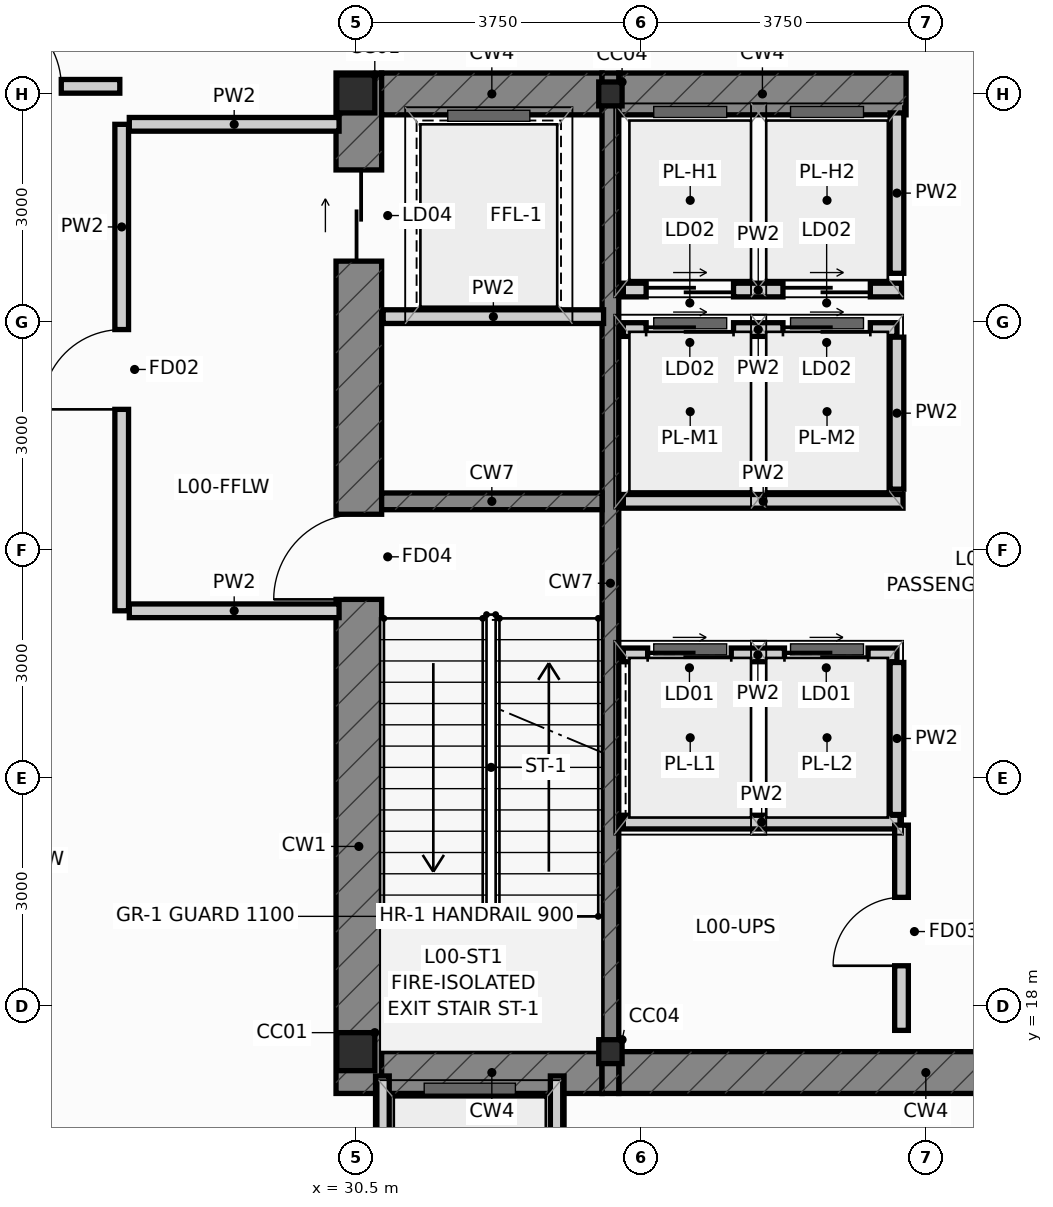
"""IFC4 building model, lengths in metres.
Left out: names, types, materials, properties, quantities, classifications, styles, units other than length and angle.
Written with IfcOpenShell. Run it as: python <this file> out.ifc"""

import sys

from ifc_helpers import new_model, si_unit, direction, frame, frame_2d, origin, origin_2d, place, context, subcontext, project, spatial, rectangle, i_section, extrude, source, transform, mapped, element, fill, save


model = new_model("IFC4")
c1 = context("Model", 3, precision=1e-05, world=origin(), true_north=direction((0.0, 1.0)))
c2 = subcontext(c1, "Body", "Model", "MODEL_VIEW")
j1 = project(units=[si_unit("LENGTHUNIT", "METRE"), si_unit("PLANEANGLEUNIT", "RADIAN")], contexts=[c1])
p1 = place(None, origin())
s1 = spatial("IfcSite", under=j1, at=p1, CompositionType="ELEMENT")
p2 = place(p1, origin())
s2 = spatial("IfcBuilding", under=s1, at=p2, CompositionType="ELEMENT")
p3 = place(p2, origin())
s3 = spatial("IfcBuildingStorey", under=s2, at=p3, CompositionType="ELEMENT", Elevation=0.0)
m1 = source(origin(), c2, "Body", "SweptSolid", [
    extrude(i_section(OverallWidth=0.5, OverallDepth=0.5, WebThickness=0.028, FlangeThickness=0.04, at=origin_2d()), origin(), (0.0, 0.0, 1.0), 5.4),
])
for number, where, z_axis, x_axis in (
    (1, (30.5, 17.4, 0.0), (0.0, 0.0, 1.0), (1.0, 0.0, 0.0)),
    (2, (30.5, 30.0, 0.0), (0.0, 0.0, 1.0), (1.0, 0.0, 0.0)),
):
    element("IfcColumn", number, at=place(p3, frame(where, z_axis=z_axis, x_axis=x_axis)), inside=s3, PredefinedType="COLUMN", context=c2, shape_type="MappedRepresentation", body=[
        mapped(m1, transform((0.0, 0.0, 0.0), scale=1.0)),
    ])
m2 = source(origin(), c2, "Body", "SweptSolid", [
    extrude(i_section(OverallWidth=0.307, OverallDepth=0.315, WebThickness=0.012, FlangeThickness=0.019, at=origin_2d()), origin(), (0.0, 0.0, 1.0), 5.4),
])
for number, where, z_axis, x_axis in (
    (3, (33.85, 17.4, 0.0), (0.0, 0.0, 1.0), (1.0, 0.0, 0.0)),
    (4, (33.85, 30.0, 0.0), (0.0, 0.0, 1.0), (1.0, 0.0, 0.0)),
):
    element("IfcColumn", number, at=place(p3, frame(where, z_axis=z_axis, x_axis=x_axis)), inside=s3, PredefinedType="COLUMN", context=c2, shape_type="MappedRepresentation", body=[
        mapped(m2, transform((0.0, 0.0, 0.0), scale=1.0)),
    ])
p4 = place(p3, frame((30.54, 16.85, 0.0), z_axis=(0.0, 0.0, 1.0), x_axis=(0.0, 1.0, 0.0)))
e5 = element("IfcWall", 5, at=p4, inside=s3, PredefinedType="SHEAR", context=c2, shape_type="SweptSolid", body=[
    extrude(rectangle(XDim=13.425, YDim=0.6, at=frame_2d((6.712, 0.0))), origin(), (0.0, 0.0, 1.0), 5.4),
])
p5 = place(p4, frame((6.5, 0.0, 0.0)))
e6 = element("IfcOpeningElement", 6, at=p5, cuts=e5, PredefinedType="OPENING", context=c2, shape_type="SweptSolid", body=[
    extrude(rectangle(XDim=1.12, YDim=2.15, at=frame_2d((0.56, 1.075))), frame((0.0, 0.312, 0.0), z_axis=(0.0, -1.0, 0.0), x_axis=(1.0, 0.0, 0.0)), (0.0, 0.0, 1.0), 0.624),
])
p6 = place(p4, frame((10.95, 0.0, 0.0)))
e7 = element("IfcOpeningElement", 7, at=p6, cuts=e5, PredefinedType="OPENING", context=c2, shape_type="SweptSolid", body=[
    extrude(rectangle(XDim=1.2, YDim=2.2, at=frame_2d((0.6, 1.1))), frame((0.0, 0.312, 0.0), z_axis=(0.0, -1.0, 0.0), x_axis=(1.0, 0.0, 0.0)), (0.0, 0.0, 1.0), 0.624),
])
p7 = place(p3, frame((30.84, 17.125, 0.0), z_axis=(0.0, 0.0, 1.0), x_axis=(1.0, 0.0, 0.0)))
e8 = element("IfcWall", 8, at=p7, inside=s3, PredefinedType="SHEAR", context=c2, shape_type="SweptSolid", body=[
    extrude(rectangle(XDim=2.9, YDim=0.55, at=frame_2d((1.45, 0.0))), origin(), (0.0, 0.0, 1.0), 5.4),
])
p8 = place(p3, frame((33.96, 17.125, 0.0), z_axis=(0.0, 0.0, 1.0), x_axis=(1.0, 0.0, 0.0)))
e9 = element("IfcWall", 9, at=p8, inside=s3, PredefinedType="SHEAR", context=c2, shape_type="SweptSolid", body=[
    extrude(rectangle(XDim=8.08, YDim=0.55, at=frame_2d((4.04, 0.0))), origin(), (0.0, 0.0, 1.0), 5.4),
])
p9 = place(p3, frame((30.84, 30.0, 0.0), z_axis=(0.0, 0.0, 1.0), x_axis=(1.0, 0.0, 0.0)))
e10 = element("IfcWall", 10, at=p9, inside=s3, PredefinedType="SHEAR", context=c2, shape_type="SweptSolid", body=[
    extrude(rectangle(XDim=2.9, YDim=0.55, at=frame_2d((1.45, 0.0))), origin(), (0.0, 0.0, 1.0), 5.4),
])
p10 = place(p3, frame((33.96, 30.0, 0.0), z_axis=(0.0, 0.0, 1.0), x_axis=(1.0, 0.0, 0.0)))
e11 = element("IfcWall", 11, at=p10, inside=s3, PredefinedType="SHEAR", context=c2, shape_type="SweptSolid", body=[
    extrude(rectangle(XDim=3.78, YDim=0.55, at=frame_2d((1.89, 0.0))), origin(), (0.0, 0.0, 1.0), 5.4),
])
p11 = place(p3, frame((33.85, 16.85, 0.0), z_axis=(0.0, 0.0, 1.0), x_axis=(0.0, 1.0, 0.0)))
e12 = element("IfcWall", 12, at=p11, inside=s3, PredefinedType="SHEAR", context=c2, shape_type="SweptSolid", body=[
    extrude(rectangle(XDim=13.425, YDim=0.22, at=frame_2d((6.712, 0.0))), origin(), (0.0, 0.0, 1.0), 5.4),
])
p12 = place(p3, frame((30.84, 24.64, 0.0), z_axis=(0.0, 0.0, 1.0), x_axis=(1.0, 0.0, 0.0)))
e13 = element("IfcWall", 13, at=p12, inside=s3, PredefinedType="SHEAR", context=c2, shape_type="SweptSolid", body=[
    extrude(rectangle(XDim=2.9, YDim=0.22, at=frame_2d((1.45, 0.0))), origin(), (0.0, 0.0, 1.0), 5.4),
])
p13 = place(p3, frame((30.85, 14.42, 0.0), z_axis=(0.0, 0.0, 1.0), x_axis=(0.0, 1.0, 0.0)))
e14 = element("IfcWall", 14, at=p13, inside=s3, PredefinedType="PARTITIONING", context=c2, shape_type="SweptSolid", body=[
    extrude(rectangle(XDim=2.66, YDim=0.18, at=frame_2d((1.33, 0.0))), origin(), (0.0, 0.0, 1.0), 4.453),
])
p14 = place(p3, frame((33.15, 14.42, 0.0), z_axis=(0.0, 0.0, 1.0), x_axis=(0.0, 1.0, 0.0)))
e15 = element("IfcWall", 15, at=p14, inside=s3, PredefinedType="PARTITIONING", context=c2, shape_type="SweptSolid", body=[
    extrude(rectangle(XDim=2.66, YDim=0.18, at=frame_2d((1.33, 0.0))), origin(), (0.0, 0.0, 1.0), 5.08),
])
p15 = place(p3, frame((34.02, 22.62, 0.0), z_axis=(0.0, 0.0, 1.0), x_axis=(1.0, 0.0, 0.0)))
e16 = element("IfcWall", 16, at=p15, inside=s3, PredefinedType="PARTITIONING", context=c2, shape_type="SweptSolid", body=[
    extrude(rectangle(XDim=3.6, YDim=0.18, at=frame_2d((1.8, 0.0))), origin(), (0.0, 0.0, 1.0), 5.08),
])
p16 = place(p15, frame((0.32, 0.0, 0.0)))
e17 = element("IfcOpeningElement", 17, at=p16, cuts=e16, PredefinedType="OPENING", context=c2, shape_type="SweptSolid", body=[
    extrude(rectangle(XDim=1.1, YDim=2.2, at=frame_2d((0.55, 1.1))), frame((0.0, 0.102, 0.0), z_axis=(0.0, -1.0, 0.0), x_axis=(1.0, 0.0, 0.0)), (0.0, 0.0, 1.0), 0.204),
])
p17 = place(p15, frame((2.12, 0.0, 0.0)))
e18 = element("IfcOpeningElement", 18, at=p17, cuts=e16, PredefinedType="OPENING", context=c2, shape_type="SweptSolid", body=[
    extrude(rectangle(XDim=1.1, YDim=2.2, at=frame_2d((0.55, 1.1))), frame((0.0, 0.102, 0.0), z_axis=(0.0, -1.0, 0.0), x_axis=(1.0, 0.0, 0.0)), (0.0, 0.0, 1.0), 0.204),
])
p18 = place(p3, frame((37.62, 20.52, 0.0), z_axis=(0.0, 0.0, 1.0), x_axis=(0.0, 1.0, 0.0)))
e19 = element("IfcWall", 19, at=p18, inside=s3, PredefinedType="PARTITIONING", context=c2, shape_type="SweptSolid", body=[
    extrude(rectangle(XDim=2.0, YDim=0.18, at=frame_2d((1.0, 0.0))), origin(), (0.0, 0.0, 1.0), 5.08),
])
p19 = place(p3, frame((34.02, 26.9, 0.0), z_axis=(0.0, 0.0, 1.0), x_axis=(1.0, 0.0, 0.0)))
e20 = element("IfcWall", 20, at=p19, inside=s3, PredefinedType="PARTITIONING", context=c2, shape_type="SweptSolid", body=[
    extrude(rectangle(XDim=3.6, YDim=0.18, at=frame_2d((1.8, 0.0))), origin(), (0.0, 0.0, 1.0), 5.08),
])
p20 = place(p19, frame((0.3, 0.0, 0.0)))
e21 = element("IfcOpeningElement", 21, at=p20, cuts=e20, PredefinedType="OPENING", context=c2, shape_type="SweptSolid", body=[
    extrude(rectangle(XDim=1.15, YDim=2.2, at=frame_2d((0.575, 1.1))), frame((0.0, 0.102, 0.0), z_axis=(0.0, -1.0, 0.0), x_axis=(1.0, 0.0, 0.0)), (0.0, 0.0, 1.0), 0.204),
])
p21 = place(p19, frame((2.1, 0.0, 0.0)))
e22 = element("IfcOpeningElement", 22, at=p21, cuts=e20, PredefinedType="OPENING", context=c2, shape_type="SweptSolid", body=[
    extrude(rectangle(XDim=1.15, YDim=2.2, at=frame_2d((0.575, 1.1))), frame((0.0, 0.102, 0.0), z_axis=(0.0, -1.0, 0.0), x_axis=(1.0, 0.0, 0.0)), (0.0, 0.0, 1.0), 0.204),
])
p22 = place(p3, frame((37.62, 24.8, 0.0), z_axis=(0.0, 0.0, 1.0), x_axis=(0.0, 1.0, 0.0)))
e23 = element("IfcWall", 23, at=p22, inside=s3, PredefinedType="PARTITIONING", context=c2, shape_type="SweptSolid", body=[
    extrude(rectangle(XDim=2.0, YDim=0.18, at=frame_2d((1.0, 0.0))), origin(), (0.0, 0.0, 1.0), 5.08),
])
p23 = place(p3, frame((34.02, 24.64, 0.0), z_axis=(0.0, 0.0, 1.0), x_axis=(1.0, 0.0, 0.0)))
e24 = element("IfcWall", 24, at=p23, inside=s3, PredefinedType="PARTITIONING", context=c2, shape_type="SweptSolid", body=[
    extrude(rectangle(XDim=3.68, YDim=0.18, at=frame_2d((1.84, 0.0))), origin(), (0.0, 0.0, 1.0), 5.08),
])
p24 = place(p3, frame((34.02, 27.42, 0.0), z_axis=(0.0, 0.0, 1.0), x_axis=(1.0, 0.0, 0.0)))
e25 = element("IfcWall", 25, at=p24, inside=s3, PredefinedType="PARTITIONING", context=c2, shape_type="SweptSolid", body=[
    extrude(rectangle(XDim=3.66, YDim=0.18, at=frame_2d((1.83, 0.0))), origin(), (0.0, 0.0, 1.0), 5.08),
])
p25 = place(p24, frame((0.3, 0.0, 0.0)))
e26 = element("IfcOpeningElement", 26, at=p25, cuts=e25, PredefinedType="OPENING", context=c2, shape_type="SweptSolid", body=[
    extrude(rectangle(XDim=1.15, YDim=2.2, at=frame_2d((0.575, 1.1))), frame((0.0, 0.102, 0.0), z_axis=(0.0, -1.0, 0.0), x_axis=(1.0, 0.0, 0.0)), (0.0, 0.0, 1.0), 0.204),
])
p26 = place(p24, frame((2.1, 0.0, 0.0)))
e27 = element("IfcOpeningElement", 27, at=p26, cuts=e25, PredefinedType="OPENING", context=c2, shape_type="SweptSolid", body=[
    extrude(rectangle(XDim=1.15, YDim=2.2, at=frame_2d((0.575, 1.1))), frame((0.0, 0.102, 0.0), z_axis=(0.0, -1.0, 0.0), x_axis=(1.0, 0.0, 0.0)), (0.0, 0.0, 1.0), 0.204),
])
p27 = place(p3, frame((37.62, 27.64, 0.0), z_axis=(0.0, 0.0, 1.0), x_axis=(0.0, 1.0, 0.0)))
e28 = element("IfcWall", 28, at=p27, inside=s3, PredefinedType="PARTITIONING", context=c2, shape_type="SweptSolid", body=[
    extrude(rectangle(XDim=2.11, YDim=0.18, at=frame_2d((1.055, 0.0))), origin(), (0.0, 0.0, 1.0), 5.08),
])
p28 = place(p3, frame((27.42, 23.2, 0.0), z_axis=(0.0, 0.0, 1.0), x_axis=(0.0, 1.0, 0.0)))
e29 = element("IfcWall", 29, at=p28, inside=s3, PredefinedType="PARTITIONING", context=c2, shape_type="SweptSolid", body=[
    extrude(rectangle(XDim=6.4, YDim=0.18, at=frame_2d((3.2, 0.0))), origin(), (0.0, 0.0, 1.0), 4.706),
])
p29 = place(p28, frame((2.65, 0.0, 0.0)))
e30 = element("IfcOpeningElement", 30, at=p29, cuts=e29, PredefinedType="OPENING", context=c2, shape_type="SweptSolid", body=[
    extrude(rectangle(XDim=1.05, YDim=2.15, at=frame_2d((0.525, 1.075))), frame((0.0, 0.102, 0.0), z_axis=(0.0, -1.0, 0.0), x_axis=(1.0, 0.0, 0.0)), (0.0, 0.0, 1.0), 0.204),
])
p30 = place(p3, frame((27.52, 23.2, 0.0), z_axis=(0.0, 0.0, 1.0), x_axis=(1.0, 0.0, 0.0)))
e31 = element("IfcWall", 31, at=p30, inside=s3, PredefinedType="PARTITIONING", context=c2, shape_type="SweptSolid", body=[
    extrude(rectangle(XDim=2.76, YDim=0.18, at=frame_2d((1.38, 0.0))), origin(), (0.0, 0.0, 1.0), 5.08),
])
p31 = place(p3, frame((27.52, 29.6, 0.0), z_axis=(0.0, 0.0, 1.0), x_axis=(1.0, 0.0, 0.0)))
e32 = element("IfcWall", 32, at=p31, inside=s3, PredefinedType="PARTITIONING", context=c2, shape_type="SweptSolid", body=[
    extrude(rectangle(XDim=2.76, YDim=0.18, at=frame_2d((1.38, 0.0))), origin(), (0.0, 0.0, 1.0), 4.453),
])
p32 = place(p3, frame((30.86, 27.07, 0.0), z_axis=(0.0, 0.0, 1.0), x_axis=(1.0, 0.0, 0.0)))
e33 = element("IfcWall", 33, at=p32, inside=s3, PredefinedType="PARTITIONING", context=c2, shape_type="SweptSolid", body=[
    extrude(rectangle(XDim=2.9, YDim=0.18, at=frame_2d((1.45, 0.0))), origin(), (0.0, 0.0, 1.0), 5.08),
])
p33 = place(p3, frame((34.02, 20.42, 0.0), z_axis=(0.0, 0.0, 1.0), x_axis=(1.0, 0.0, 0.0)))
e34 = element("IfcWall", 34, at=p33, inside=s3, PredefinedType="PARTITIONING", context=c2, shape_type="SweptSolid", body=[
    extrude(rectangle(XDim=3.64, YDim=0.18, at=frame_2d((1.82, 0.0))), origin(), (0.0, 0.0, 1.0), 5.08),
])
p34 = place(p3, frame((37.68, 17.68, 0.0), z_axis=(0.0, 0.0, 1.0), x_axis=(0.0, 1.0, 0.0)))
e35 = element("IfcWall", 35, at=p34, inside=s3, PredefinedType="PARTITIONING", context=c2, shape_type="SweptSolid", body=[
    extrude(rectangle(XDim=2.7, YDim=0.18, at=frame_2d((1.35, 0.0))), origin(), (0.0, 0.0, 1.0), 5.08),
])
p35 = place(p34, frame((0.85, 0.0, 0.0)))
e36 = element("IfcOpeningElement", 36, at=p35, cuts=e35, PredefinedType="OPENING", context=c2, shape_type="SweptSolid", body=[
    extrude(rectangle(XDim=0.9, YDim=2.1, at=frame_2d((0.45, 1.05))), frame((0.0, 0.102, 0.0), z_axis=(0.0, -1.0, 0.0), x_axis=(1.0, 0.0, 0.0)), (0.0, 0.0, 1.0), 0.204),
])
p36 = place(p3, frame((24.805, 30.1, 0.0), z_axis=(0.0, 0.0, 1.0), x_axis=(1.0, 0.0, 0.0)))
e37 = element("IfcWall", 37, at=p36, inside=s3, PredefinedType="PARTITIONING", context=c2, shape_type="SweptSolid", body=[
    extrude(rectangle(XDim=2.59, YDim=0.18, at=frame_2d((1.295, 0.0))), origin(), (0.0, 0.0, 1.0), 4.453),
])
p37 = place(p36, frame((0.77, 0.0, 0.0)))
e38 = element("IfcOpeningElement", 38, at=p37, cuts=e37, PredefinedType="OPENING", context=c2, shape_type="SweptSolid", body=[
    extrude(rectangle(XDim=1.05, YDim=2.15, at=frame_2d((0.525, 1.075))), frame((0.0, 0.102, 0.0), z_axis=(0.0, -1.0, 0.0), x_axis=(1.0, 0.0, 0.0)), (0.0, 0.0, 1.0), 0.204),
])
p38 = place(p5, origin())
e39 = element("IfcDoor", 39, at=p38, inside=s3, OperationType="SINGLE_SWING_LEFT", PredefinedType="DOOR", context=c2, shape_type="SweptSolid", body=[
    extrude(rectangle(XDim=1.12, YDim=2.15, at=frame_2d((0.56, 1.075))), frame((0.0, 0.025, 0.0), z_axis=(0.0, -1.0, 0.0), x_axis=(1.0, 0.0, 0.0)), (0.0, 0.0, 1.0), 0.05),
])
fill(e6, e39)
p39 = place(p6, origin())
e40 = element("IfcDoor", 40, at=p39, inside=s3, OperationType="SLIDING_TO_LEFT", PredefinedType="DOOR", context=c2, shape_type="SweptSolid", body=[
    extrude(rectangle(XDim=1.2, YDim=2.2, at=frame_2d((0.6, 1.1))), frame((0.0, 0.025, 0.0), z_axis=(0.0, -1.0, 0.0), x_axis=(1.0, 0.0, 0.0)), (0.0, 0.0, 1.0), 0.05),
])
fill(e7, e40)
p40 = place(p16, origin())
e41 = element("IfcDoor", 41, at=p40, inside=s3, OperationType="SLIDING_TO_LEFT", PredefinedType="DOOR", context=c2, shape_type="SweptSolid", body=[
    extrude(rectangle(XDim=1.1, YDim=2.2, at=frame_2d((0.55, 1.1))), frame((0.0, 0.025, 0.0), z_axis=(0.0, -1.0, 0.0), x_axis=(1.0, 0.0, 0.0)), (0.0, 0.0, 1.0), 0.05),
])
fill(e17, e41)
p41 = place(p17, origin())
e42 = element("IfcDoor", 42, at=p41, inside=s3, OperationType="SLIDING_TO_RIGHT", PredefinedType="DOOR", context=c2, shape_type="SweptSolid", body=[
    extrude(rectangle(XDim=1.1, YDim=2.2, at=frame_2d((0.55, 1.1))), frame((0.0, 0.025, 0.0), z_axis=(0.0, -1.0, 0.0), x_axis=(1.0, 0.0, 0.0)), (0.0, 0.0, 1.0), 0.05),
])
fill(e18, e42)
p42 = place(p20, origin())
e43 = element("IfcDoor", 43, at=p42, inside=s3, OperationType="SLIDING_TO_LEFT", PredefinedType="DOOR", context=c2, shape_type="SweptSolid", body=[
    extrude(rectangle(XDim=1.15, YDim=2.2, at=frame_2d((0.575, 1.1))), frame((0.0, 0.025, 0.0), z_axis=(0.0, -1.0, 0.0), x_axis=(1.0, 0.0, 0.0)), (0.0, 0.0, 1.0), 0.05),
])
fill(e21, e43)
p43 = place(p21, origin())
e44 = element("IfcDoor", 44, at=p43, inside=s3, OperationType="SLIDING_TO_RIGHT", PredefinedType="DOOR", context=c2, shape_type="SweptSolid", body=[
    extrude(rectangle(XDim=1.15, YDim=2.2, at=frame_2d((0.575, 1.1))), frame((0.0, 0.025, 0.0), z_axis=(0.0, -1.0, 0.0), x_axis=(1.0, 0.0, 0.0)), (0.0, 0.0, 1.0), 0.05),
])
fill(e22, e44)
p44 = place(p25, origin())
e45 = element("IfcDoor", 45, at=p44, inside=s3, OperationType="SLIDING_TO_RIGHT", PredefinedType="DOOR", context=c2, shape_type="SweptSolid", body=[
    extrude(rectangle(XDim=1.15, YDim=2.2, at=frame_2d((0.575, 1.1))), frame((0.0, 0.025, 0.0), z_axis=(0.0, -1.0, 0.0), x_axis=(1.0, 0.0, 0.0)), (0.0, 0.0, 1.0), 0.05),
])
fill(e26, e45)
p45 = place(p26, origin())
e46 = element("IfcDoor", 46, at=p45, inside=s3, OperationType="SLIDING_TO_LEFT", PredefinedType="DOOR", context=c2, shape_type="SweptSolid", body=[
    extrude(rectangle(XDim=1.15, YDim=2.2, at=frame_2d((0.575, 1.1))), frame((0.0, 0.025, 0.0), z_axis=(0.0, -1.0, 0.0), x_axis=(1.0, 0.0, 0.0)), (0.0, 0.0, 1.0), 0.05),
])
fill(e27, e46)
p46 = place(p29, origin())
e47 = element("IfcDoor", 47, at=p46, inside=s3, OperationType="SINGLE_SWING_LEFT", PredefinedType="DOOR", context=c2, shape_type="SweptSolid", body=[
    extrude(rectangle(XDim=1.05, YDim=2.15, at=frame_2d((0.525, 1.075))), frame((0.0, 0.025, 0.0), z_axis=(0.0, -1.0, 0.0), x_axis=(1.0, 0.0, 0.0)), (0.0, 0.0, 1.0), 0.05),
])
fill(e30, e47)
p47 = place(p35, origin())
e48 = element("IfcDoor", 48, at=p47, inside=s3, OperationType="SINGLE_SWING_LEFT", PredefinedType="DOOR", context=c2, shape_type="SweptSolid", body=[
    extrude(rectangle(XDim=0.9, YDim=2.1, at=frame_2d((0.45, 1.05))), frame((0.0, 0.025, 0.0), z_axis=(0.0, -1.0, 0.0), x_axis=(1.0, 0.0, 0.0)), (0.0, 0.0, 1.0), 0.05),
])
fill(e36, e48)
p48 = place(p37, origin())
e49 = element("IfcDoor", 49, at=p48, inside=s3, OperationType="SINGLE_SWING_LEFT", PredefinedType="DOOR", context=c2, shape_type="SweptSolid", body=[
    extrude(rectangle(XDim=1.05, YDim=2.15, at=frame_2d((0.525, 1.075))), frame((0.0, 0.025, 0.0), z_axis=(0.0, -1.0, 0.0), x_axis=(1.0, 0.0, 0.0)), (0.0, 0.0, 1.0), 0.05),
])
fill(e38, e49)
save(model, sys.argv[1])
